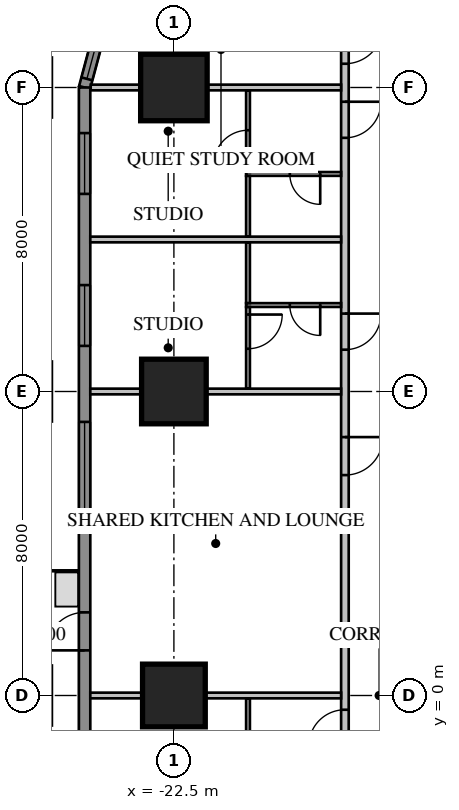
"""IFC4 building model, lengths in metres.
Left out: names, types, materials, properties, quantities, classifications, styles, units other than length and angle.
Written with IfcOpenShell. Run it as: python <this file> out.ifc"""

import sys

from ifc_helpers import new_model, si_unit, direction, frame, frame_2d, origin, origin_2d, place, context, subcontext, project, spatial, rectangle, extrude, element, fill, save


model = new_model("IFC4")
c1 = context("Model", 3, precision=1e-05, world=origin(), true_north=direction((0.0, 1.0)))
c2 = subcontext(c1, "Body", "Model", "MODEL_VIEW")
j1 = project(units=[si_unit("LENGTHUNIT", "METRE"), si_unit("PLANEANGLEUNIT", "RADIAN")], contexts=[c1])
p1 = place(None, origin())
s1 = spatial("IfcSite", under=j1, at=p1, CompositionType="ELEMENT")
p2 = place(p1, origin())
s2 = spatial("IfcBuilding", under=s1, at=p2, CompositionType="ELEMENT")
p3 = place(p2, frame((0.0, 0.0, 50.65)))
s3 = spatial("IfcBuildingStorey", under=s2, at=p3, CompositionType="ELEMENT", Elevation=50.65)
p4 = place(p3, frame((-22.5, 16.0, 0.0), z_axis=(0.0, 0.0, 1.0), x_axis=(1.0, 0.0, 0.0)))
e1 = element("IfcColumn", 1, at=p4, inside=s3, PredefinedType="COLUMN", context=c2, shape_type="SweptSolid", body=[
    extrude(rectangle(XDim=1.75, YDim=1.75, at=origin_2d()), origin(), (0.0, 0.0, 1.0), 3.413),
])
p5 = place(p3, frame((-22.5, 8.0, 0.0), z_axis=(0.0, 0.0, 1.0), x_axis=(1.0, 0.0, 0.0)))
e2 = element("IfcColumn", 2, at=p5, inside=s3, PredefinedType="COLUMN", context=c2, shape_type="SweptSolid", body=[
    extrude(rectangle(XDim=1.7, YDim=1.7, at=origin_2d()), origin(), (0.0, 0.0, 1.0), 3.413),
])
p6 = place(p3, frame((-22.5, 0.0, 0.0), z_axis=(0.0, 0.0, 1.0), x_axis=(1.0, 0.0, 0.0)))
e3 = element("IfcColumn", 3, at=p6, inside=s3, PredefinedType="COLUMN", context=c2, shape_type="SweptSolid", body=[
    extrude(rectangle(XDim=1.65, YDim=1.65, at=origin_2d()), origin(), (0.0, 0.0, 1.0), 3.413),
])
p7 = place(p3, frame((-23.664, 20.425, 0.0), z_axis=(0.0, 0.0, 1.0), x_axis=(-0.258839972501, -0.965920218567, 0.0)))
e4 = element("IfcWall", 4, at=p7, inside=s3, PredefinedType="SOLIDWALL", context=c2, shape_type="SweptSolid", body=[
    extrude(rectangle(XDim=4.581, YDim=0.3, at=frame_2d((2.291, 0.0))), origin(), (0.0, 0.0, 1.0), 3.65),
])
p8 = place(p7, frame((2.746, 0.0, 0.75)))
e5 = element("IfcOpeningElement", 5, at=p8, cuts=e4, PredefinedType="OPENING", context=c2, shape_type="SweptSolid", body=[
    extrude(rectangle(XDim=1.6, YDim=1.8, at=frame_2d((0.8, 0.9))), frame((0.0, 0.17, 0.0), z_axis=(0.0, -1.0, 0.0), x_axis=(1.0, 0.0, 0.0)), (0.0, 0.0, 1.0), 0.34),
])
p9 = place(p3, frame((-24.85, 16.0, 0.0), z_axis=(0.0, 0.0, 1.0), x_axis=(0.0, -1.0, 0.0)))
e6 = element("IfcWall", 6, at=p9, inside=s3, PredefinedType="SOLIDWALL", context=c2, shape_type="SweptSolid", body=[
    extrude(rectangle(XDim=32.0, YDim=0.3, at=frame_2d((16.0, 0.0))), origin(), (0.0, 0.0, 1.0), 3.65),
])
p10 = place(p9, frame((1.2, 0.0, 0.75)))
e7 = element("IfcOpeningElement", 7, at=p10, cuts=e6, PredefinedType="OPENING", context=c2, shape_type="SweptSolid", body=[
    extrude(rectangle(XDim=1.6, YDim=1.8, at=frame_2d((0.8, 0.9))), frame((0.0, 0.17, 0.0), z_axis=(0.0, -1.0, 0.0), x_axis=(1.0, 0.0, 0.0)), (0.0, 0.0, 1.0), 0.34),
])
p11 = place(p9, frame((5.2, 0.0, 0.75)))
e8 = element("IfcOpeningElement", 8, at=p11, cuts=e6, PredefinedType="OPENING", context=c2, shape_type="SweptSolid", body=[
    extrude(rectangle(XDim=1.6, YDim=1.8, at=frame_2d((0.8, 0.9))), frame((0.0, 0.17, 0.0), z_axis=(0.0, -1.0, 0.0), x_axis=(1.0, 0.0, 0.0)), (0.0, 0.0, 1.0), 0.34),
])
p12 = place(p9, frame((17.2, 0.0, 0.75)))
e9 = element("IfcOpeningElement", 9, at=p12, cuts=e6, PredefinedType="OPENING", context=c2, shape_type="SweptSolid", body=[
    extrude(rectangle(XDim=1.6, YDim=1.8, at=frame_2d((0.8, 0.9))), frame((0.0, 0.17, 0.0), z_axis=(0.0, -1.0, 0.0), x_axis=(1.0, 0.0, 0.0)), (0.0, 0.0, 1.0), 0.34),
])
p13 = place(p9, frame((21.2, 0.0, 0.75)))
e10 = element("IfcOpeningElement", 10, at=p13, cuts=e6, PredefinedType="OPENING", context=c2, shape_type="SweptSolid", body=[
    extrude(rectangle(XDim=1.6, YDim=1.8, at=frame_2d((0.8, 0.9))), frame((0.0, 0.17, 0.0), z_axis=(0.0, -1.0, 0.0), x_axis=(1.0, 0.0, 0.0)), (0.0, 0.0, 1.0), 0.34),
])
p14 = place(p9, frame((25.2, 0.0, 0.75)))
e11 = element("IfcOpeningElement", 11, at=p14, cuts=e6, PredefinedType="OPENING", context=c2, shape_type="SweptSolid", body=[
    extrude(rectangle(XDim=1.6, YDim=1.8, at=frame_2d((0.8, 0.9))), frame((0.0, 0.17, 0.0), z_axis=(0.0, -1.0, 0.0), x_axis=(1.0, 0.0, 0.0)), (0.0, 0.0, 1.0), 0.34),
])
p15 = place(p9, frame((29.2, 0.0, 0.75)))
e12 = element("IfcOpeningElement", 12, at=p15, cuts=e6, PredefinedType="OPENING", context=c2, shape_type="SweptSolid", body=[
    extrude(rectangle(XDim=1.6, YDim=1.8, at=frame_2d((0.8, 0.9))), frame((0.0, 0.17, 0.0), z_axis=(0.0, -1.0, 0.0), x_axis=(1.0, 0.0, 0.0)), (0.0, 0.0, 1.0), 0.34),
])
p16 = place(p9, frame((8.8, 0.0, 0.75)))
e13 = element("IfcOpeningElement", 13, at=p16, cuts=e6, PredefinedType="OPENING", context=c2, shape_type="SweptSolid", body=[
    extrude(rectangle(XDim=2.4, YDim=1.8, at=frame_2d((1.2, 0.9))), frame((0.0, 0.17, 0.0), z_axis=(0.0, -1.0, 0.0), x_axis=(1.0, 0.0, 0.0)), (0.0, 0.0, 1.0), 0.34),
])
p17 = place(p9, frame((13.812, 0.0, 0.0)))
e14 = element("IfcOpeningElement", 14, at=p17, cuts=e6, PredefinedType="OPENING", context=c2, shape_type="SweptSolid", body=[
    extrude(rectangle(XDim=1.0, YDim=2.4, at=frame_2d((0.5, 1.2))), frame((0.0, 0.17, 0.0), z_axis=(0.0, -1.0, 0.0), x_axis=(1.0, 0.0, 0.0)), (0.0, 0.0, 1.0), 0.34),
])
p18 = place(p3, frame((-18.0, 18.0, 0.0), z_axis=(0.0, 0.0, 1.0), x_axis=(0.0, -1.0, 0.0)))
e15 = element("IfcWall", 15, at=p18, inside=s3, PredefinedType="PARTITIONING", context=c2, shape_type="SweptSolid", body=[
    extrude(rectangle(XDim=36.0, YDim=0.2, at=frame_2d((18.0, 0.0))), origin(), (0.0, 0.0, 1.0), 3.65),
])
p19 = place(p18, frame((0.375, 0.0, 0.0)))
e16 = element("IfcOpeningElement", 16, at=p19, cuts=e15, PredefinedType="OPENING", context=c2, shape_type="SweptSolid", body=[
    extrude(rectangle(XDim=1.0, YDim=2.1, at=frame_2d((0.5, 1.05))), frame((0.0, 0.12, 0.0), z_axis=(0.0, -1.0, 0.0), x_axis=(1.0, 0.0, 0.0)), (0.0, 0.0, 1.0), 0.24),
])
p20 = place(p18, frame((2.375, 0.0, 0.0)))
e17 = element("IfcOpeningElement", 17, at=p20, cuts=e15, PredefinedType="OPENING", context=c2, shape_type="SweptSolid", body=[
    extrude(rectangle(XDim=0.95, YDim=2.1, at=frame_2d((0.475, 1.05))), frame((0.0, 0.12, 0.0), z_axis=(0.0, -1.0, 0.0), x_axis=(1.0, 0.0, 0.0)), (0.0, 0.0, 1.0), 0.24),
])
p21 = place(p18, frame((7.95, 0.0, 0.0)))
e18 = element("IfcOpeningElement", 18, at=p21, cuts=e15, PredefinedType="OPENING", context=c2, shape_type="SweptSolid", body=[
    extrude(rectangle(XDim=0.95, YDim=2.1, at=frame_2d((0.475, 1.05))), frame((0.0, 0.12, 0.0), z_axis=(0.0, -1.0, 0.0), x_axis=(1.0, 0.0, 0.0)), (0.0, 0.0, 1.0), 0.24),
])
p22 = place(p18, frame((18.375, 0.0, 0.0)))
e19 = element("IfcOpeningElement", 19, at=p22, cuts=e15, PredefinedType="OPENING", context=c2, shape_type="SweptSolid", body=[
    extrude(rectangle(XDim=0.95, YDim=2.1, at=frame_2d((0.475, 1.05))), frame((0.0, 0.12, 0.0), z_axis=(0.0, -1.0, 0.0), x_axis=(1.0, 0.0, 0.0)), (0.0, 0.0, 1.0), 0.24),
])
p23 = place(p18, frame((23.95, 0.0, 0.0)))
e20 = element("IfcOpeningElement", 20, at=p23, cuts=e15, PredefinedType="OPENING", context=c2, shape_type="SweptSolid", body=[
    extrude(rectangle(XDim=0.95, YDim=2.1, at=frame_2d((0.475, 1.05))), frame((0.0, 0.12, 0.0), z_axis=(0.0, -1.0, 0.0), x_axis=(1.0, 0.0, 0.0)), (0.0, 0.0, 1.0), 0.24),
])
p24 = place(p18, frame((26.375, 0.0, 0.0)))
e21 = element("IfcOpeningElement", 21, at=p24, cuts=e15, PredefinedType="OPENING", context=c2, shape_type="SweptSolid", body=[
    extrude(rectangle(XDim=0.95, YDim=2.1, at=frame_2d((0.475, 1.05))), frame((0.0, 0.12, 0.0), z_axis=(0.0, -1.0, 0.0), x_axis=(1.0, 0.0, 0.0)), (0.0, 0.0, 1.0), 0.24),
])
p25 = place(p18, frame((31.95, 0.0, 0.0)))
e22 = element("IfcOpeningElement", 22, at=p25, cuts=e15, PredefinedType="OPENING", context=c2, shape_type="SweptSolid", body=[
    extrude(rectangle(XDim=0.95, YDim=2.1, at=frame_2d((0.475, 1.05))), frame((0.0, 0.12, 0.0), z_axis=(0.0, -1.0, 0.0), x_axis=(1.0, 0.0, 0.0)), (0.0, 0.0, 1.0), 0.24),
])
p26 = place(p18, frame((34.375, 0.0, 0.0)))
e23 = element("IfcOpeningElement", 23, at=p26, cuts=e15, PredefinedType="OPENING", context=c2, shape_type="SweptSolid", body=[
    extrude(rectangle(XDim=0.95, YDim=2.1, at=frame_2d((0.475, 1.05))), frame((0.0, 0.12, 0.0), z_axis=(0.0, -1.0, 0.0), x_axis=(1.0, 0.0, 0.0)), (0.0, 0.0, 1.0), 0.24),
])
p27 = place(p18, frame((11.2, 0.0, 0.0)))
e24 = element("IfcOpeningElement", 24, at=p27, cuts=e15, PredefinedType="OPENING", context=c2, shape_type="SweptSolid", body=[
    extrude(rectangle(XDim=1.0, YDim=2.1, at=frame_2d((0.5, 1.05))), frame((0.0, 0.12, 0.0), z_axis=(0.0, -1.0, 0.0), x_axis=(1.0, 0.0, 0.0)), (0.0, 0.0, 1.0), 0.24),
])
p28 = place(p3, frame((-18.1, 16.0, 0.0), z_axis=(0.0, 0.0, 1.0), x_axis=(-1.0, 0.0, 0.0)))
e25 = element("IfcWall", 25, at=p28, inside=s3, PredefinedType="PARTITIONING", context=c2, shape_type="SweptSolid", body=[
    extrude(rectangle(XDim=6.589, YDim=0.15, at=frame_2d((3.295, 0.0))), origin(), (0.0, 0.0, 1.0), 3.65),
])
for number, where, z_axis, x_axis in (
    (26, (-18.1, 12.0, 0.0), (0.0, 0.0, 1.0), (-1.0, 0.0, 0.0)),
    (27, (-18.1, 8.0, 0.0), (0.0, 0.0, 1.0), (-1.0, 0.0, 0.0)),
):
    element("IfcWall", number, at=place(p3, frame(where, z_axis=z_axis, x_axis=x_axis)), inside=s3, PredefinedType="PARTITIONING", context=c2, shape_type="SweptSolid", body=[
        extrude(rectangle(XDim=6.6, YDim=0.15, at=frame_2d((3.3, 0.0))), origin(), (0.0, 0.0, 1.0), 3.65),
    ])
p29 = place(p3, frame((-18.1, 0.0, 0.0), z_axis=(0.0, 0.0, 1.0), x_axis=(-1.0, 0.0, 0.0)))
e28 = element("IfcWall", 28, at=p29, inside=s3, PredefinedType="PARTITIONING", context=c2, shape_type="SweptSolid", body=[
    extrude(rectangle(XDim=6.6, YDim=0.15, at=frame_2d((3.3, 0.0))), origin(), (0.0, 0.0, 1.0), 2.888),
])
p30 = place(p3, frame((-18.1, 13.725, 0.0), z_axis=(0.0, 0.0, 1.0), x_axis=(-1.0, 0.0, 0.0)))
e29 = element("IfcWall", 29, at=p30, inside=s3, PredefinedType="PARTITIONING", context=c2, shape_type="SweptSolid", body=[
    extrude(rectangle(XDim=2.5, YDim=0.1, at=frame_2d((1.25, 0.0))), origin(), (0.0, 0.0, 1.0), 3.65),
])
p31 = place(p30, frame((0.55, 0.0, 0.0)))
e30 = element("IfcOpeningElement", 30, at=p31, cuts=e29, PredefinedType="OPENING", context=c2, shape_type="SweptSolid", body=[
    extrude(rectangle(XDim=0.8, YDim=2.1, at=frame_2d((0.4, 1.05))), frame((0.0, 0.07, 0.0), z_axis=(0.0, -1.0, 0.0), x_axis=(1.0, 0.0, 0.0)), (0.0, 0.0, 1.0), 0.14),
])
p32 = place(p3, frame((-20.55, 13.675, 0.0), z_axis=(0.0, 0.0, 1.0), x_axis=(0.0, -1.0, 0.0)))
e31 = element("IfcWall", 31, at=p32, inside=s3, PredefinedType="PARTITIONING", context=c2, shape_type="SweptSolid", body=[
    extrude(rectangle(XDim=1.6, YDim=0.1, at=frame_2d((0.8, 0.0))), origin(), (0.0, 0.0, 1.0), 3.65),
])
p33 = place(p3, frame((-18.1, 10.275, 0.0), z_axis=(0.0, 0.0, 1.0), x_axis=(-1.0, 0.0, 0.0)))
e32 = element("IfcWall", 32, at=p33, inside=s3, PredefinedType="PARTITIONING", context=c2, shape_type="SweptSolid", body=[
    extrude(rectangle(XDim=2.5, YDim=0.1, at=frame_2d((1.25, 0.0))), origin(), (0.0, 0.0, 1.0), 3.65),
])
p34 = place(p33, frame((0.55, 0.0, 0.0)))
e33 = element("IfcOpeningElement", 33, at=p34, cuts=e32, PredefinedType="OPENING", context=c2, shape_type="SweptSolid", body=[
    extrude(rectangle(XDim=0.8, YDim=2.1, at=frame_2d((0.4, 1.05))), frame((0.0, 0.07, 0.0), z_axis=(0.0, -1.0, 0.0), x_axis=(1.0, 0.0, 0.0)), (0.0, 0.0, 1.0), 0.14),
])
p35 = place(p3, frame((-20.55, 11.925, 0.0), z_axis=(0.0, 0.0, 1.0), x_axis=(0.0, -1.0, 0.0)))
e34 = element("IfcWall", 34, at=p35, inside=s3, PredefinedType="PARTITIONING", context=c2, shape_type="SweptSolid", body=[
    extrude(rectangle(XDim=1.6, YDim=0.1, at=frame_2d((0.8, 0.0))), origin(), (0.0, 0.0, 1.0), 3.65),
])
p36 = place(p3, frame((-20.55, 15.925, 0.0), z_axis=(0.0, 0.0, 1.0), x_axis=(0.0, -1.0, 0.0)))
e35 = element("IfcWall", 35, at=p36, inside=s3, PredefinedType="PARTITIONING", context=c2, shape_type="SweptSolid", body=[
    extrude(rectangle(XDim=2.15, YDim=0.1, at=frame_2d((1.075, 0.0))), origin(), (0.0, 0.0, 1.0), 3.65),
])
p37 = place(p36, frame((1.05, 0.0, 0.0)))
e36 = element("IfcOpeningElement", 36, at=p37, cuts=e35, PredefinedType="OPENING", context=c2, shape_type="SweptSolid", body=[
    extrude(rectangle(XDim=0.9, YDim=2.1, at=frame_2d((0.45, 1.05))), frame((0.0, 0.07, 0.0), z_axis=(0.0, -1.0, 0.0), x_axis=(1.0, 0.0, 0.0)), (0.0, 0.0, 1.0), 0.14),
])
p38 = place(p3, frame((-20.55, 10.225, 0.0), z_axis=(0.0, 0.0, 1.0), x_axis=(0.0, -1.0, 0.0)))
e37 = element("IfcWall", 37, at=p38, inside=s3, PredefinedType="PARTITIONING", context=c2, shape_type="SweptSolid", body=[
    extrude(rectangle(XDim=2.15, YDim=0.1, at=frame_2d((1.075, 0.0))), origin(), (0.0, 0.0, 1.0), 3.65),
])
p39 = place(p38, frame((0.2, 0.0, 0.0)))
e38 = element("IfcOpeningElement", 38, at=p39, cuts=e37, PredefinedType="OPENING", context=c2, shape_type="SweptSolid", body=[
    extrude(rectangle(XDim=0.9, YDim=2.1, at=frame_2d((0.45, 1.05))), frame((0.0, 0.07, 0.0), z_axis=(0.0, -1.0, 0.0), x_axis=(1.0, 0.0, 0.0)), (0.0, 0.0, 1.0), 0.14),
])
p40 = place(p3, frame((-20.55, -0.075, 0.0), z_axis=(0.0, 0.0, 1.0), x_axis=(0.0, -1.0, 0.0)))
e39 = element("IfcWall", 39, at=p40, inside=s3, PredefinedType="PARTITIONING", context=c2, shape_type="SweptSolid", body=[
    extrude(rectangle(XDim=2.15, YDim=0.1, at=frame_2d((1.075, 0.0))), origin(), (0.0, 0.0, 1.0), 3.65),
])
p41 = place(p40, frame((1.05, 0.0, 0.0)))
e40 = element("IfcOpeningElement", 40, at=p41, cuts=e39, PredefinedType="OPENING", context=c2, shape_type="SweptSolid", body=[
    extrude(rectangle(XDim=0.9, YDim=2.1, at=frame_2d((0.45, 1.05))), frame((0.0, 0.07, 0.0), z_axis=(0.0, -1.0, 0.0), x_axis=(1.0, 0.0, 0.0)), (0.0, 0.0, 1.0), 0.14),
])
p42 = place(p8, origin())
e41 = element("IfcWindow", 41, at=p42, inside=s3, PartitioningType="SINGLE_PANEL", PredefinedType="WINDOW", context=c2, shape_type="SweptSolid", body=[
    extrude(rectangle(XDim=1.6, YDim=1.8, at=frame_2d((0.8, 0.9))), frame((0.0, 0.03, 0.0), z_axis=(0.0, -1.0, 0.0), x_axis=(1.0, 0.0, 0.0)), (0.0, 0.0, 1.0), 0.06),
])
fill(e5, e41)
p43 = place(p10, origin())
e42 = element("IfcWindow", 42, at=p43, inside=s3, PartitioningType="SINGLE_PANEL", PredefinedType="WINDOW", context=c2, shape_type="SweptSolid", body=[
    extrude(rectangle(XDim=1.6, YDim=1.8, at=frame_2d((0.8, 0.9))), frame((0.0, 0.03, 0.0), z_axis=(0.0, -1.0, 0.0), x_axis=(1.0, 0.0, 0.0)), (0.0, 0.0, 1.0), 0.06),
])
fill(e7, e42)
p44 = place(p11, origin())
e43 = element("IfcWindow", 43, at=p44, inside=s3, PartitioningType="SINGLE_PANEL", PredefinedType="WINDOW", context=c2, shape_type="SweptSolid", body=[
    extrude(rectangle(XDim=1.6, YDim=1.8, at=frame_2d((0.8, 0.9))), frame((0.0, 0.03, 0.0), z_axis=(0.0, -1.0, 0.0), x_axis=(1.0, 0.0, 0.0)), (0.0, 0.0, 1.0), 0.06),
])
fill(e8, e43)
p45 = place(p16, origin())
e44 = element("IfcWindow", 44, at=p45, inside=s3, PartitioningType="SINGLE_PANEL", PredefinedType="WINDOW", context=c2, shape_type="SweptSolid", body=[
    extrude(rectangle(XDim=2.4, YDim=1.8, at=frame_2d((1.2, 0.9))), frame((0.0, 0.03, 0.0), z_axis=(0.0, -1.0, 0.0), x_axis=(1.0, 0.0, 0.0)), (0.0, 0.0, 1.0), 0.06),
])
fill(e13, e44)
p46 = place(p17, origin())
e45 = element("IfcDoor", 45, at=p46, inside=s3, OperationType="SINGLE_SWING_RIGHT", PredefinedType="DOOR", context=c2, shape_type="SweptSolid", body=[
    extrude(rectangle(XDim=1.0, YDim=2.4, at=frame_2d((0.5, 1.2))), frame((0.0, 0.025, 0.0), z_axis=(0.0, -1.0, 0.0), x_axis=(1.0, 0.0, 0.0)), (0.0, 0.0, 1.0), 0.05),
])
fill(e14, e45)
p47 = place(p19, origin())
e46 = element("IfcDoor", 46, at=p47, inside=s3, OperationType="SINGLE_SWING_LEFT", PredefinedType="DOOR", context=c2, shape_type="SweptSolid", body=[
    extrude(rectangle(XDim=1.0, YDim=2.1, at=frame_2d((0.5, 1.05))), frame((0.0, 0.025, 0.0), z_axis=(0.0, -1.0, 0.0), x_axis=(1.0, 0.0, 0.0)), (0.0, 0.0, 1.0), 0.05),
])
fill(e16, e46)
p48 = place(p20, origin())
e47 = element("IfcDoor", 47, at=p48, inside=s3, OperationType="SINGLE_SWING_LEFT", PredefinedType="DOOR", context=c2, shape_type="SweptSolid", body=[
    extrude(rectangle(XDim=0.95, YDim=2.1, at=frame_2d((0.475, 1.05))), frame((0.0, 0.025, 0.0), z_axis=(0.0, -1.0, 0.0), x_axis=(1.0, 0.0, 0.0)), (0.0, 0.0, 1.0), 0.05),
])
fill(e17, e47)
p49 = place(p31, origin())
e48 = element("IfcDoor", 48, at=p49, inside=s3, OperationType="SINGLE_SWING_LEFT", PredefinedType="DOOR", context=c2, shape_type="SweptSolid", body=[
    extrude(rectangle(XDim=0.8, YDim=2.1, at=frame_2d((0.4, 1.05))), frame((0.0, 0.025, 0.0), z_axis=(0.0, -1.0, 0.0), x_axis=(1.0, 0.0, 0.0)), (0.0, 0.0, 1.0), 0.05),
])
fill(e30, e48)
p50 = place(p21, origin())
e49 = element("IfcDoor", 49, at=p50, inside=s3, OperationType="SINGLE_SWING_LEFT", PredefinedType="DOOR", context=c2, shape_type="SweptSolid", body=[
    extrude(rectangle(XDim=0.95, YDim=2.1, at=frame_2d((0.475, 1.05))), frame((0.0, 0.025, 0.0), z_axis=(0.0, -1.0, 0.0), x_axis=(1.0, 0.0, 0.0)), (0.0, 0.0, 1.0), 0.05),
])
fill(e18, e49)
p51 = place(p34, origin())
e50 = element("IfcDoor", 50, at=p51, inside=s3, OperationType="SINGLE_SWING_LEFT", PredefinedType="DOOR", context=c2, shape_type="SweptSolid", body=[
    extrude(rectangle(XDim=0.8, YDim=2.1, at=frame_2d((0.4, 1.05))), frame((0.0, 0.025, 0.0), z_axis=(0.0, -1.0, 0.0), x_axis=(1.0, 0.0, 0.0)), (0.0, 0.0, 1.0), 0.05),
])
fill(e33, e50)
p52 = place(p22, origin())
e51 = element("IfcDoor", 51, at=p52, inside=s3, OperationType="SINGLE_SWING_RIGHT", PredefinedType="DOOR", context=c2, shape_type="SweptSolid", body=[
    extrude(rectangle(XDim=0.95, YDim=2.1, at=frame_2d((0.475, 1.05))), frame((0.0, 0.025, 0.0), z_axis=(0.0, -1.0, 0.0), x_axis=(1.0, 0.0, 0.0)), (0.0, 0.0, 1.0), 0.05),
])
fill(e19, e51)
p53 = place(p27, origin())
e52 = element("IfcDoor", 52, at=p53, inside=s3, OperationType="SINGLE_SWING_LEFT", PredefinedType="DOOR", context=c2, shape_type="SweptSolid", body=[
    extrude(rectangle(XDim=1.0, YDim=2.1, at=frame_2d((0.5, 1.05))), frame((0.0, 0.025, 0.0), z_axis=(0.0, -1.0, 0.0), x_axis=(1.0, 0.0, 0.0)), (0.0, 0.0, 1.0), 0.05),
])
fill(e24, e52)
p54 = place(p37, origin())
e53 = element("IfcDoor", 53, at=p54, inside=s3, OperationType="SINGLE_SWING_RIGHT", PredefinedType="DOOR", context=c2, shape_type="SweptSolid", body=[
    extrude(rectangle(XDim=0.9, YDim=2.1, at=frame_2d((0.45, 1.05))), frame((0.0, 0.025, 0.0), z_axis=(0.0, -1.0, 0.0), x_axis=(1.0, 0.0, 0.0)), (0.0, 0.0, 1.0), 0.05),
])
fill(e36, e53)
p55 = place(p39, origin())
e54 = element("IfcDoor", 54, at=p55, inside=s3, OperationType="SINGLE_SWING_LEFT", PredefinedType="DOOR", context=c2, shape_type="SweptSolid", body=[
    extrude(rectangle(XDim=0.9, YDim=2.1, at=frame_2d((0.45, 1.05))), frame((0.0, 0.025, 0.0), z_axis=(0.0, -1.0, 0.0), x_axis=(1.0, 0.0, 0.0)), (0.0, 0.0, 1.0), 0.05),
])
fill(e38, e54)
save(model, sys.argv[1])
